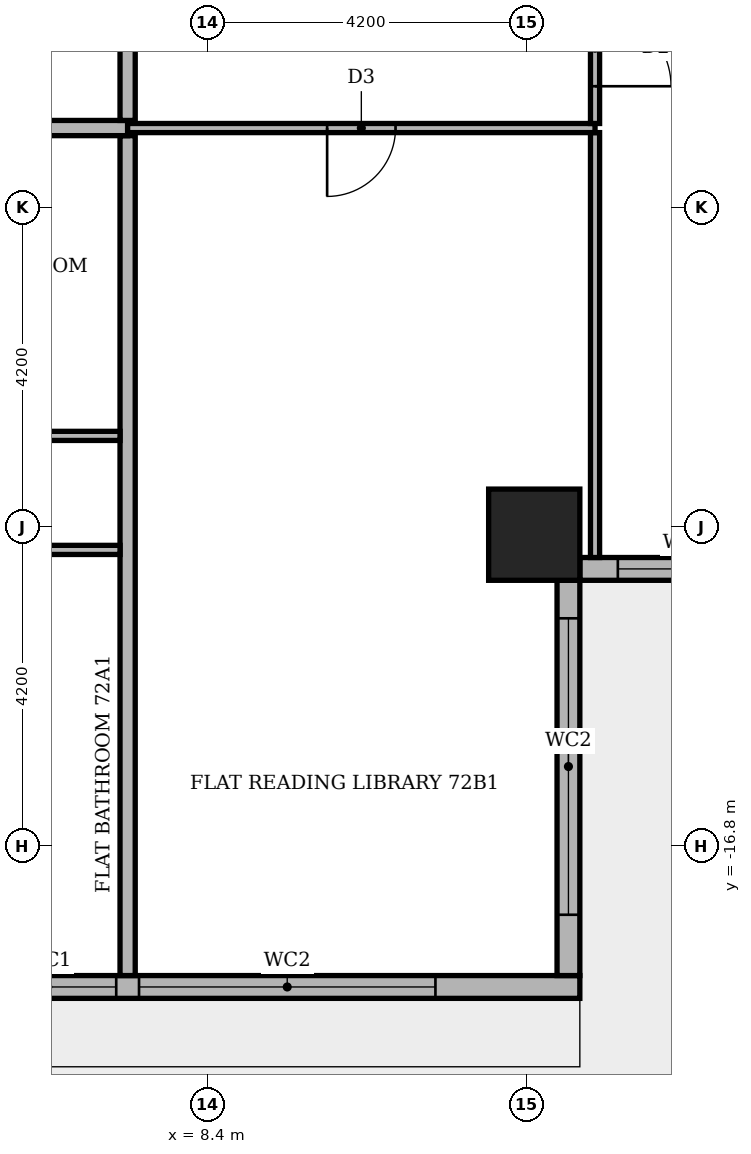
"""IFC4 building model, lengths in metres.
Left out: names, types, materials, properties, quantities, classifications, styles, units other than length and angle.
Written with IfcOpenShell. Run it as: python <this file> out.ifc"""

import sys

from ifc_helpers import new_model, si_unit, direction, frame, frame_2d, origin, origin_2d, place, context, subcontext, project, spatial, rectangle, extrude, element, fill, save


model = new_model("IFC4")
c1 = context("Model", 3, precision=1e-05, world=origin(), true_north=direction((0.0, 1.0)))
c2 = subcontext(c1, "Body", "Model", "MODEL_VIEW")
j1 = project(units=[si_unit("LENGTHUNIT", "METRE"), si_unit("PLANEANGLEUNIT", "RADIAN")], contexts=[c1])
p1 = place(None, origin())
s1 = spatial("IfcSite", under=j1, at=p1, CompositionType="ELEMENT")
p2 = place(p1, origin())
s2 = spatial("IfcBuilding", under=s1, at=p2, CompositionType="ELEMENT")
p3 = place(p2, frame((0.0, 0.0, 300.6)))
s3 = spatial("IfcBuildingStorey", under=s2, at=p3, CompositionType="ELEMENT", Elevation=300.6)
p4 = place(p3, frame((12.7, -12.7, -0.35), z_axis=(0.0, 0.0, 1.0), x_axis=(1.0, 0.0, 0.0)))
e1 = element("IfcColumn", 1, at=p4, inside=s3, PredefinedType="COLUMN", context=c2, shape_type="SweptSolid", body=[
    extrude(rectangle(XDim=1.2, YDim=1.2, at=origin_2d()), origin(), (0.0, 0.0, 1.0), 4.25),
])
p5 = place(p3, frame((-13.0, -18.65, 0.0), z_axis=(0.0, 0.0, 1.0), x_axis=(1.0, 0.0, 0.0)))
e2 = element("IfcWall", 2, at=p5, inside=s3, PredefinedType="STANDARD", context=c2, shape_type="SweptSolid", body=[
    extrude(rectangle(XDim=26.3, YDim=0.3, at=frame_2d((13.15, 0.0))), origin(), (0.0, 0.0, 1.0), 3.55),
])
p6 = place(p5, frame((1.6, 0.0, 0.6)))
e3 = element("IfcOpeningElement", 3, at=p6, cuts=e2, PredefinedType="OPENING", context=c2, shape_type="SweptSolid", body=[
    extrude(rectangle(XDim=1.8, YDim=2.4, at=frame_2d((0.9, 1.2))), frame((0.0, 0.16, 0.0), z_axis=(0.0, -1.0, 0.0), x_axis=(1.0, 0.0, 0.0)), (0.0, 0.0, 1.0), 0.32),
])
p7 = place(p5, frame((3.7, 0.0, 0.0)))
e4 = element("IfcOpeningElement", 4, at=p7, cuts=e2, PredefinedType="OPENING", context=c2, shape_type="SweptSolid", body=[
    extrude(rectangle(XDim=3.9, YDim=2.4, at=frame_2d((1.95, 1.2))), frame((0.0, 0.16, 0.0), z_axis=(0.0, -1.0, 0.0), x_axis=(1.0, 0.0, 0.0)), (0.0, 0.0, 1.0), 0.32),
])
p8 = place(p5, frame((7.9, 0.0, 0.6)))
e5 = element("IfcOpeningElement", 5, at=p8, cuts=e2, PredefinedType="OPENING", context=c2, shape_type="SweptSolid", body=[
    extrude(rectangle(XDim=1.8, YDim=2.4, at=frame_2d((0.9, 1.2))), frame((0.0, 0.16, 0.0), z_axis=(0.0, -1.0, 0.0), x_axis=(1.0, 0.0, 0.0)), (0.0, 0.0, 1.0), 0.32),
])
p9 = place(p5, frame((10.0, 0.0, 0.0)))
e6 = element("IfcOpeningElement", 6, at=p9, cuts=e2, PredefinedType="OPENING", context=c2, shape_type="SweptSolid", body=[
    extrude(rectangle(XDim=1.8, YDim=2.4, at=frame_2d((0.9, 1.2))), frame((0.0, 0.16, 0.0), z_axis=(0.0, -1.0, 0.0), x_axis=(1.0, 0.0, 0.0)), (0.0, 0.0, 1.0), 0.32),
])
p10 = place(p5, frame((12.1, 0.0, 0.6)))
e7 = element("IfcOpeningElement", 7, at=p10, cuts=e2, PredefinedType="OPENING", context=c2, shape_type="SweptSolid", body=[
    extrude(rectangle(XDim=3.9, YDim=2.4, at=frame_2d((1.95, 1.2))), frame((0.0, 0.16, 0.0), z_axis=(0.0, -1.0, 0.0), x_axis=(1.0, 0.0, 0.0)), (0.0, 0.0, 1.0), 0.32),
])
p11 = place(p5, frame((16.3, 0.0, 0.6)))
e8 = element("IfcOpeningElement", 8, at=p11, cuts=e2, PredefinedType="OPENING", context=c2, shape_type="SweptSolid", body=[
    extrude(rectangle(XDim=1.8, YDim=2.4, at=frame_2d((0.9, 1.2))), frame((0.0, 0.16, 0.0), z_axis=(0.0, -1.0, 0.0), x_axis=(1.0, 0.0, 0.0)), (0.0, 0.0, 1.0), 0.32),
])
p12 = place(p5, frame((18.4, 0.0, 0.6)))
e9 = element("IfcOpeningElement", 9, at=p12, cuts=e2, PredefinedType="OPENING", context=c2, shape_type="SweptSolid", body=[
    extrude(rectangle(XDim=1.8, YDim=2.4, at=frame_2d((0.9, 1.2))), frame((0.0, 0.16, 0.0), z_axis=(0.0, -1.0, 0.0), x_axis=(1.0, 0.0, 0.0)), (0.0, 0.0, 1.0), 0.32),
])
p13 = place(p5, frame((20.5, 0.0, 0.6)))
e10 = element("IfcOpeningElement", 10, at=p13, cuts=e2, PredefinedType="OPENING", context=c2, shape_type="SweptSolid", body=[
    extrude(rectangle(XDim=3.9, YDim=2.4, at=frame_2d((1.95, 1.2))), frame((0.0, 0.16, 0.0), z_axis=(0.0, -1.0, 0.0), x_axis=(1.0, 0.0, 0.0)), (0.0, 0.0, 1.0), 0.32),
])
p14 = place(p3, frame((13.15, -18.5, 0.0), z_axis=(0.0, 0.0, 1.0), x_axis=(0.0, 1.0, 0.0)))
e11 = element("IfcWall", 11, at=p14, inside=s3, PredefinedType="STANDARD", context=c2, shape_type="SweptSolid", body=[
    extrude(rectangle(XDim=5.2, YDim=0.3, at=frame_2d((2.6, 0.0))), origin(), (0.0, 0.0, 1.0), 3.55),
])
p15 = place(p14, frame((0.8, 0.0, 0.6)))
e12 = element("IfcOpeningElement", 12, at=p15, cuts=e11, PredefinedType="OPENING", context=c2, shape_type="SweptSolid", body=[
    extrude(rectangle(XDim=3.9, YDim=2.4, at=frame_2d((1.95, 1.2))), frame((0.0, 0.16, 0.0), z_axis=(0.0, -1.0, 0.0), x_axis=(1.0, 0.0, 0.0)), (0.0, 0.0, 1.0), 0.32),
])
p16 = place(p3, frame((13.3, -13.15, 0.0), z_axis=(0.0, 0.0, 1.0), x_axis=(1.0, 0.0, 0.0)))
e13 = element("IfcWall", 13, at=p16, inside=s3, PredefinedType="STANDARD", context=c2, shape_type="SweptSolid", body=[
    extrude(rectangle(XDim=5.5, YDim=0.3, at=frame_2d((2.75, 0.0))), origin(), (0.0, 0.0, 1.0), 3.55),
])
p17 = place(p16, frame((0.5, 0.0, 0.6)))
e14 = element("IfcOpeningElement", 14, at=p17, cuts=e13, PredefinedType="OPENING", context=c2, shape_type="SweptSolid", body=[
    extrude(rectangle(XDim=1.8, YDim=2.4, at=frame_2d((0.9, 1.2))), frame((0.0, 0.16, 0.0), z_axis=(0.0, -1.0, 0.0), x_axis=(1.0, 0.0, 0.0)), (0.0, 0.0, 1.0), 0.32),
])
p18 = place(p16, frame((2.6, 0.0, 0.0)))
e15 = element("IfcOpeningElement", 15, at=p18, cuts=e13, PredefinedType="OPENING", context=c2, shape_type="SweptSolid", body=[
    extrude(rectangle(XDim=1.8, YDim=2.4, at=frame_2d((0.9, 1.2))), frame((0.0, 0.16, 0.0), z_axis=(0.0, -1.0, 0.0), x_axis=(1.0, 0.0, 0.0)), (0.0, 0.0, 1.0), 0.32),
])
p19 = place(p3, frame((7.35, -18.5, 0.0), z_axis=(0.0, 0.0, 1.0), x_axis=(0.0, 1.0, 0.0)))
e16 = element("IfcWall", 16, at=p19, inside=s3, PredefinedType="PARTITIONING", context=c2, shape_type="SweptSolid", body=[
    extrude(rectangle(XDim=11.05, YDim=0.2, at=frame_2d((5.525, 0.0))), origin(), (0.0, 0.0, 1.0), 3.55),
])
p20 = place(p3, frame((13.5, -13.0, 0.0), z_axis=(0.0, 0.0, 1.0), x_axis=(0.0, 1.0, 0.0)))
e17 = element("IfcWall", 17, at=p20, inside=s3, PredefinedType="PARTITIONING", context=c2, shape_type="SweptSolid", body=[
    extrude(rectangle(XDim=5.59, YDim=0.12, at=frame_2d((2.795, 0.0))), origin(), (0.0, 0.0, 1.0), 3.55),
])
p21 = place(p3, frame((-12.1, -12.9, 0.0), z_axis=(0.0, 0.0, 1.0), x_axis=(1.0, 0.0, 0.0)))
e18 = element("IfcWall", 18, at=p21, inside=s3, PredefinedType="PARTITIONING", context=c2, shape_type="SweptSolid", body=[
    extrude(rectangle(XDim=19.35, YDim=0.12, at=frame_2d((9.675, 0.0))), origin(), (0.0, 0.0, 1.0), 3.55),
])
p22 = place(p21, frame((5.3, 0.0, 0.0)))
e19 = element("IfcOpeningElement", 19, at=p22, cuts=e18, PredefinedType="OPENING", context=c2, shape_type="SweptSolid", body=[
    extrude(rectangle(XDim=1.0, YDim=2.1, at=frame_2d((0.5, 1.05))), frame((0.0, 0.07, 0.0), z_axis=(0.0, -1.0, 0.0), x_axis=(1.0, 0.0, 0.0)), (0.0, 0.0, 1.0), 0.14),
])
p23 = place(p21, frame((10.6, 0.0, 0.0)))
e20 = element("IfcOpeningElement", 20, at=p23, cuts=e18, PredefinedType="OPENING", context=c2, shape_type="SweptSolid", body=[
    extrude(rectangle(XDim=0.9, YDim=2.1, at=frame_2d((0.45, 1.05))), frame((0.0, 0.07, 0.0), z_axis=(0.0, -1.0, 0.0), x_axis=(1.0, 0.0, 0.0)), (0.0, 0.0, 1.0), 0.14),
])
p24 = place(p3, frame((-1.05, -11.4, 0.0), z_axis=(0.0, 0.0, 1.0), x_axis=(1.0, 0.0, 0.0)))
e21 = element("IfcWall", 21, at=p24, inside=s3, PredefinedType="PARTITIONING", context=c2, shape_type="SweptSolid", body=[
    extrude(rectangle(XDim=8.3, YDim=0.12, at=frame_2d((4.15, 0.0))), origin(), (0.0, 0.0, 1.0), 3.55),
])
p25 = place(p24, frame((2.7, 0.0, 0.0)))
e22 = element("IfcOpeningElement", 22, at=p25, cuts=e21, PredefinedType="OPENING", context=c2, shape_type="SweptSolid", body=[
    extrude(rectangle(XDim=0.9, YDim=2.1, at=frame_2d((0.45, 1.05))), frame((0.0, 0.07, 0.0), z_axis=(0.0, -1.0, 0.0), x_axis=(1.0, 0.0, 0.0)), (0.0, 0.0, 1.0), 0.14),
])
p26 = place(p24, frame((5.85, 0.0, 0.0)))
e23 = element("IfcOpeningElement", 23, at=p26, cuts=e21, PredefinedType="OPENING", context=c2, shape_type="SweptSolid", body=[
    extrude(rectangle(XDim=0.9, YDim=2.1, at=frame_2d((0.45, 1.05))), frame((0.0, 0.07, 0.0), z_axis=(0.0, -1.0, 0.0), x_axis=(1.0, 0.0, 0.0)), (0.0, 0.0, 1.0), 0.14),
])
p27 = place(p3, frame((-18.5, -7.35, 0.0), z_axis=(0.0, 0.0, 1.0), x_axis=(1.0, 0.0, 0.0)))
e24 = element("IfcWall", 24, at=p27, inside=s3, PredefinedType="PARTITIONING", context=c2, shape_type="SweptSolid", body=[
    extrude(rectangle(XDim=25.85, YDim=0.2, at=frame_2d((12.925, 0.0))), origin(), (0.0, 0.0, 1.0), 3.55),
])
p28 = place(p27, frame((13.75, 0.0, 0.0)))
e25 = element("IfcOpeningElement", 25, at=p28, cuts=e24, PredefinedType="OPENING", context=c2, shape_type="SweptSolid", body=[
    extrude(rectangle(XDim=1.1, YDim=2.4, at=frame_2d((0.55, 1.2))), frame((0.0, 0.11, 0.0), z_axis=(0.0, -1.0, 0.0), x_axis=(1.0, 0.0, 0.0)), (0.0, 0.0, 1.0), 0.22),
])
p29 = place(p3, frame((7.35, -7.35, 0.0), z_axis=(0.0, 0.0, 1.0), x_axis=(1.0, 0.0, 0.0)))
e26 = element("IfcWall", 26, at=p29, inside=s3, PredefinedType="PARTITIONING", context=c2, shape_type="SweptSolid", body=[
    extrude(rectangle(XDim=6.15, YDim=0.12, at=frame_2d((3.075, 0.0))), origin(), (0.0, 0.0, 1.0), 3.55),
])
p30 = place(p29, frame((2.625, 0.0, 0.0)))
e27 = element("IfcOpeningElement", 27, at=p30, cuts=e26, PredefinedType="OPENING", context=c2, shape_type="SweptSolid", body=[
    extrude(rectangle(XDim=0.9, YDim=2.1, at=frame_2d((0.45, 1.05))), frame((0.0, 0.07, 0.0), z_axis=(0.0, -1.0, 0.0), x_axis=(1.0, 0.0, 0.0)), (0.0, 0.0, 1.0), 0.14),
])
p31 = place(p3, frame((13.5, -7.29, 0.0), z_axis=(0.0, 0.0, 1.0), x_axis=(0.0, 1.0, 0.0)))
e28 = element("IfcWall", 28, at=p31, inside=s3, PredefinedType="PARTITIONING", context=c2, shape_type="SweptSolid", body=[
    extrude(rectangle(XDim=1.98, YDim=0.12, at=frame_2d((0.99, 0.0))), origin(), (0.0, 0.0, 1.0), 3.55),
])
p32 = place(p31, frame((0.49, 0.0, 0.0)))
e29 = element("IfcOpeningElement", 29, at=p32, cuts=e28, PredefinedType="OPENING", context=c2, shape_type="SweptSolid", body=[
    extrude(rectangle(XDim=1.0, YDim=2.1, at=frame_2d((0.5, 1.05))), frame((0.0, 0.07, 0.0), z_axis=(0.0, -1.0, 0.0), x_axis=(1.0, 0.0, 0.0)), (0.0, 0.0, 1.0), 0.14),
])
p33 = place(p3, frame((7.35, -7.25, 0.0), z_axis=(0.0, 0.0, 1.0), x_axis=(0.0, 1.0, 0.0)))
e30 = element("IfcWall", 30, at=p33, inside=s3, PredefinedType="PARTITIONING", context=c2, shape_type="SweptSolid", body=[
    extrude(rectangle(XDim=14.5, YDim=0.2, at=frame_2d((7.25, 0.0))), origin(), (0.0, 0.0, 1.0), 3.55),
])
p34 = place(p33, frame((2.5, 0.0, 0.0)))
e31 = element("IfcOpeningElement", 31, at=p34, cuts=e30, PredefinedType="OPENING", context=c2, shape_type="SweptSolid", body=[
    extrude(rectangle(XDim=1.1, YDim=2.4, at=frame_2d((0.55, 1.2))), frame((0.0, 0.11, 0.0), z_axis=(0.0, -1.0, 0.0), x_axis=(1.0, 0.0, 0.0)), (0.0, 0.0, 1.0), 0.22),
])
p35 = place(p12, origin())
e32 = element("IfcWindow", 32, at=p35, inside=s3, PartitioningType="SINGLE_PANEL", PredefinedType="WINDOW", context=c2, shape_type="SweptSolid", body=[
    extrude(rectangle(XDim=1.8, YDim=2.4, at=frame_2d((0.9, 1.2))), frame((0.0, 0.03, 0.0), z_axis=(0.0, -1.0, 0.0), x_axis=(1.0, 0.0, 0.0)), (0.0, 0.0, 1.0), 0.06),
])
fill(e9, e32)
p36 = place(p13, origin())
e33 = element("IfcWindow", 33, at=p36, inside=s3, PartitioningType="SINGLE_PANEL", PredefinedType="WINDOW", context=c2, shape_type="SweptSolid", body=[
    extrude(rectangle(XDim=3.9, YDim=2.4, at=frame_2d((1.95, 1.2))), frame((0.0, 0.03, 0.0), z_axis=(0.0, -1.0, 0.0), x_axis=(1.0, 0.0, 0.0)), (0.0, 0.0, 1.0), 0.06),
])
fill(e10, e33)
p37 = place(p15, origin())
e34 = element("IfcWindow", 34, at=p37, inside=s3, PartitioningType="SINGLE_PANEL", PredefinedType="WINDOW", context=c2, shape_type="SweptSolid", body=[
    extrude(rectangle(XDim=3.9, YDim=2.4, at=frame_2d((1.95, 1.2))), frame((0.0, 0.03, 0.0), z_axis=(0.0, -1.0, 0.0), x_axis=(1.0, 0.0, 0.0)), (0.0, 0.0, 1.0), 0.06),
])
fill(e12, e34)
p38 = place(p17, origin())
e35 = element("IfcWindow", 35, at=p38, inside=s3, PartitioningType="SINGLE_PANEL", PredefinedType="WINDOW", context=c2, shape_type="SweptSolid", body=[
    extrude(rectangle(XDim=1.8, YDim=2.4, at=frame_2d((0.9, 1.2))), frame((0.0, 0.03, 0.0), z_axis=(0.0, -1.0, 0.0), x_axis=(1.0, 0.0, 0.0)), (0.0, 0.0, 1.0), 0.06),
])
fill(e14, e35)
p39 = place(p30, frame((0.9, 0.0, 0.0), z_axis=(0.0, 0.0, 1.0), x_axis=(-1.0, 0.0, 0.0)))
e36 = element("IfcDoor", 36, at=p39, inside=s3, OperationType="SINGLE_SWING_LEFT", PredefinedType="DOOR", context=c2, shape_type="SweptSolid", body=[
    extrude(rectangle(XDim=0.9, YDim=2.1, at=frame_2d((0.45, 1.05))), frame((0.0, 0.025, 0.0), z_axis=(0.0, -1.0, 0.0), x_axis=(1.0, 0.0, 0.0)), (0.0, 0.0, 1.0), 0.05),
])
fill(e27, e36)
p40 = place(p32, frame((1.0, 0.0, 0.0), z_axis=(0.0, 0.0, 1.0), x_axis=(-1.0, 0.0, 0.0)))
e37 = element("IfcDoor", 37, at=p40, inside=s3, OperationType="SINGLE_SWING_LEFT", PredefinedType="DOOR", context=c2, shape_type="SweptSolid", body=[
    extrude(rectangle(XDim=1.0, YDim=2.1, at=frame_2d((0.5, 1.05))), frame((0.0, 0.025, 0.0), z_axis=(0.0, -1.0, 0.0), x_axis=(1.0, 0.0, 0.0)), (0.0, 0.0, 1.0), 0.05),
])
fill(e29, e37)
save(model, sys.argv[1])
